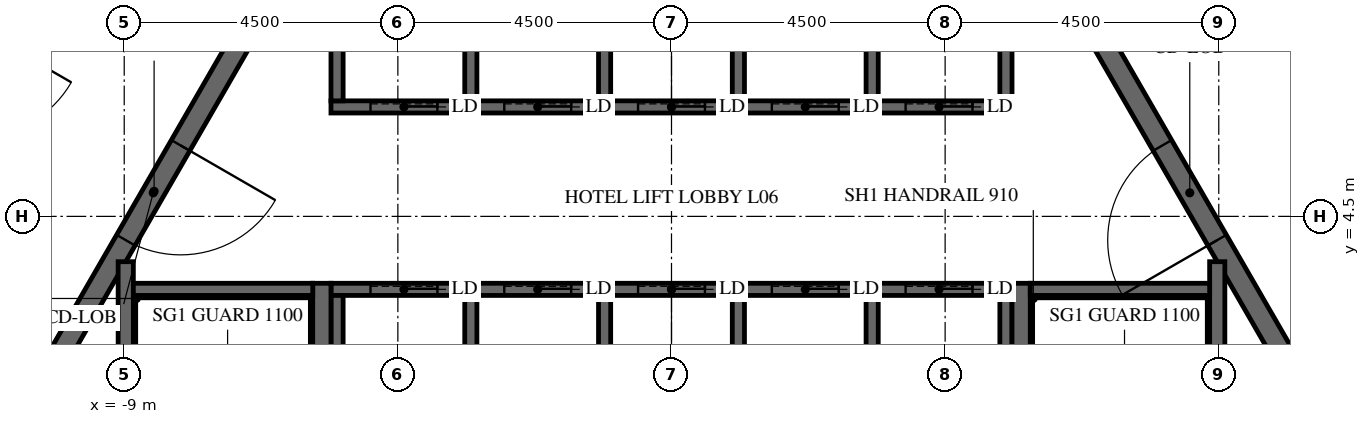
"""IFC4 building model, lengths in metres.
Left out: names, types, materials, properties, quantities, classifications, styles, units other than length and angle.
Written with IfcOpenShell. Run it as: python <this file> out.ifc"""

import sys

from ifc_helpers import new_model, si_unit, direction, frame, frame_2d, origin, place, context, subcontext, project, spatial, polyline, rectangle, outline, extrude, element, fill, save


model = new_model("IFC4")
c1 = context("Model", 3, precision=1e-05, world=origin(), true_north=direction((0.0, 1.0)))
c2 = subcontext(c1, "Body", "Model", "MODEL_VIEW")
j1 = project(units=[si_unit("LENGTHUNIT", "METRE"), si_unit("PLANEANGLEUNIT", "RADIAN")], contexts=[c1])
p1 = place(None, origin())
s1 = spatial("IfcSite", under=j1, at=p1, CompositionType="ELEMENT")
p2 = place(p1, origin())
s2 = spatial("IfcBuilding", under=s1, at=p2, CompositionType="ELEMENT")
p3 = place(p2, frame((0.0, 0.0, 37.5)))
s3 = spatial("IfcBuildingStorey", under=s2, at=p3, CompositionType="ELEMENT", Elevation=37.5)
p4 = place(p3, frame((-7.91, 13.7, -0.15), z_axis=(0.0, 0.0, 1.0), x_axis=(-0.499999880136, -0.866025472988, 0.0)))
e1 = element("IfcWall", 1, at=p4, inside=s3, PredefinedType="SHEAR", context=c2, shape_type="SweptSolid", body=[
    extrude(outline(polyline([(-0.173, -0.3), (15.993, -0.3), (15.646, 0.3), (0.173, 0.3), (-0.173, -0.3)])), origin(), (0.0, 0.0, 1.0), 3.9),
])
p5 = place(p4, frame((7.039, 0.0, 0.15)))
e2 = element("IfcOpeningElement", 2, at=p5, cuts=e1, PredefinedType="OPENING", context=c2, shape_type="SweptSolid", body=[
    extrude(rectangle(XDim=1.8, YDim=2.4, at=frame_2d((0.9, 1.2))), frame((0.0, 0.31, 0.0), z_axis=(0.0, -1.0, 0.0), x_axis=(1.0, 0.0, 0.0)), (0.0, 0.0, 1.0), 0.62),
])
p6 = place(p3, frame((15.819, 0.0, -0.15), z_axis=(0.0, 0.0, 1.0), x_axis=(-0.499999880136, 0.866025472988, 0.0)))
e3 = element("IfcWall", 3, at=p6, inside=s3, PredefinedType="SHEAR", context=c2, shape_type="SweptSolid", body=[
    extrude(outline(polyline([(-0.173, -0.3), (15.993, -0.3), (15.646, 0.3), (0.173, 0.3), (-0.173, -0.3)])), origin(), (0.0, 0.0, 1.0), 3.9),
])
p7 = place(p6, frame((6.981, 0.0, 0.15)))
e4 = element("IfcOpeningElement", 4, at=p7, cuts=e3, PredefinedType="OPENING", context=c2, shape_type="SweptSolid", body=[
    extrude(rectangle(XDim=1.8, YDim=2.4, at=frame_2d((0.9, 1.2))), frame((0.0, 0.31, 0.0), z_axis=(0.0, -1.0, 0.0), x_axis=(1.0, 0.0, 0.0)), (0.0, 0.0, 1.0), 0.62),
])
p8 = place(p3, frame((-5.673, 9.825, -0.15), z_axis=(0.0, 0.0, 1.0), x_axis=(-0.499995046907, -0.866028263435, 0.0)))
e5 = element("IfcWall", 5, at=p8, inside=s3, PredefinedType="SHEAR", context=c2, shape_type="SweptSolid", body=[
    extrude(outline(polyline([(-0.101, -0.175), (11.446, -0.175), (11.244, 0.175), (0.101, 0.175), (-0.101, -0.175)])), origin(), (0.0, 0.0, 1.0), 3.9),
])
p9 = place(p8, frame((4.801, 0.0, 0.15)))
e6 = element("IfcOpeningElement", 6, at=p9, cuts=e5, PredefinedType="OPENING", context=c2, shape_type="SweptSolid", body=[
    extrude(rectangle(XDim=1.8, YDim=2.4, at=frame_2d((0.9, 1.2))), frame((0.0, 0.185, 0.0), z_axis=(0.0, -1.0, 0.0), x_axis=(1.0, 0.0, 0.0)), (0.0, 0.0, 1.0), 0.37),
])
p10 = place(p3, frame((11.345, 0.0, -0.15), z_axis=(0.0, 0.0, 1.0), x_axis=(-0.499995046907, 0.866028263435, 0.0)))
e7 = element("IfcWall", 7, at=p10, inside=s3, PredefinedType="SHEAR", context=c2, shape_type="SweptSolid", body=[
    extrude(outline(polyline([(-0.101, -0.175), (11.446, -0.175), (11.244, 0.175), (0.101, 0.175), (-0.101, -0.175)])), origin(), (0.0, 0.0, 1.0), 3.9),
])
p11 = place(p10, frame((4.744, 0.0, 0.15)))
e8 = element("IfcOpeningElement", 8, at=p11, cuts=e7, PredefinedType="OPENING", context=c2, shape_type="SweptSolid", body=[
    extrude(rectangle(XDim=1.8, YDim=2.4, at=frame_2d((0.9, 1.2))), frame((0.0, 0.185, 0.0), z_axis=(0.0, -1.0, 0.0), x_axis=(1.0, 0.0, 0.0)), (0.0, 0.0, 1.0), 0.37),
])
p12 = place(p3, frame((-5.6, 6.3, -0.25), z_axis=(0.0, 0.0, 1.0), x_axis=(1.0, 0.0, 0.0)))
e9 = element("IfcWall", 9, at=p12, inside=s3, PredefinedType="SHEAR", context=c2, shape_type="SweptSolid", body=[
    extrude(rectangle(XDim=11.2, YDim=0.2, at=frame_2d((5.6, 0.0))), origin(), (0.0, 0.0, 1.0), 3.9),
])
p13 = place(p12, frame((0.65, 0.0, 0.25)))
e10 = element("IfcOpeningElement", 10, at=p13, cuts=e9, PredefinedType="OPENING", context=c2, shape_type="SweptSolid", body=[
    extrude(rectangle(XDim=1.1, YDim=2.1, at=frame_2d((0.55, 1.05))), frame((0.0, 0.11, 0.0), z_axis=(0.0, -1.0, 0.0), x_axis=(1.0, 0.0, 0.0)), (0.0, 0.0, 1.0), 0.22),
])
p14 = place(p12, frame((2.85, 0.0, 0.25)))
e11 = element("IfcOpeningElement", 11, at=p14, cuts=e9, PredefinedType="OPENING", context=c2, shape_type="SweptSolid", body=[
    extrude(rectangle(XDim=1.1, YDim=2.1, at=frame_2d((0.55, 1.05))), frame((0.0, 0.11, 0.0), z_axis=(0.0, -1.0, 0.0), x_axis=(1.0, 0.0, 0.0)), (0.0, 0.0, 1.0), 0.22),
])
p15 = place(p12, frame((5.05, 0.0, 0.25)))
e12 = element("IfcOpeningElement", 12, at=p15, cuts=e9, PredefinedType="OPENING", context=c2, shape_type="SweptSolid", body=[
    extrude(rectangle(XDim=1.1, YDim=2.1, at=frame_2d((0.55, 1.05))), frame((0.0, 0.11, 0.0), z_axis=(0.0, -1.0, 0.0), x_axis=(1.0, 0.0, 0.0)), (0.0, 0.0, 1.0), 0.22),
])
p16 = place(p12, frame((7.25, 0.0, 0.25)))
e13 = element("IfcOpeningElement", 13, at=p16, cuts=e9, PredefinedType="OPENING", context=c2, shape_type="SweptSolid", body=[
    extrude(rectangle(XDim=1.1, YDim=2.1, at=frame_2d((0.55, 1.05))), frame((0.0, 0.11, 0.0), z_axis=(0.0, -1.0, 0.0), x_axis=(1.0, 0.0, 0.0)), (0.0, 0.0, 1.0), 0.22),
])
p17 = place(p12, frame((9.45, 0.0, 0.25)))
e14 = element("IfcOpeningElement", 14, at=p17, cuts=e9, PredefinedType="OPENING", context=c2, shape_type="SweptSolid", body=[
    extrude(rectangle(XDim=1.1, YDim=2.1, at=frame_2d((0.55, 1.05))), frame((0.0, 0.11, 0.0), z_axis=(0.0, -1.0, 0.0), x_axis=(1.0, 0.0, 0.0)), (0.0, 0.0, 1.0), 0.22),
])
for number, where, z_axis, x_axis in (
    (15, (-5.5, 6.4, -0.25), (0.0, 0.0, 1.0), (0.0, 1.0, 0.0)),
    (16, (-3.3, 6.4, -0.25), (0.0, 0.0, 1.0), (0.0, 1.0, 0.0)),
    (17, (-1.1, 6.4, -0.25), (0.0, 0.0, 1.0), (0.0, 1.0, 0.0)),
    (18, (1.1, 6.4, -0.25), (0.0, 0.0, 1.0), (0.0, 1.0, 0.0)),
    (19, (3.3, 6.4, -0.25), (0.0, 0.0, 1.0), (0.0, 1.0, 0.0)),
    (20, (5.5, 6.4, -0.25), (0.0, 0.0, 1.0), (0.0, 1.0, 0.0)),
):
    element("IfcWall", number, at=place(p3, frame(where, z_axis=z_axis, x_axis=x_axis)), inside=s3, PredefinedType="SHEAR", context=c2, shape_type="SweptSolid", body=[
        extrude(rectangle(XDim=2.9, YDim=0.2, at=frame_2d((1.45, 0.0))), origin(), (0.0, 0.0, 1.0), 3.9),
    ])
p18 = place(p3, frame((-5.6, 3.3, -0.25), z_axis=(0.0, 0.0, 1.0), x_axis=(1.0, 0.0, 0.0)))
e21 = element("IfcWall", 21, at=p18, inside=s3, PredefinedType="SHEAR", context=c2, shape_type="SweptSolid", body=[
    extrude(rectangle(XDim=11.2, YDim=0.2, at=frame_2d((5.6, 0.0))), origin(), (0.0, 0.0, 1.0), 3.9),
])
p19 = place(p18, frame((0.65, 0.0, 0.25)))
e22 = element("IfcOpeningElement", 22, at=p19, cuts=e21, PredefinedType="OPENING", context=c2, shape_type="SweptSolid", body=[
    extrude(rectangle(XDim=1.1, YDim=2.1, at=frame_2d((0.55, 1.05))), frame((0.0, 0.11, 0.0), z_axis=(0.0, -1.0, 0.0), x_axis=(1.0, 0.0, 0.0)), (0.0, 0.0, 1.0), 0.22),
])
p20 = place(p18, frame((2.85, 0.0, 0.25)))
e23 = element("IfcOpeningElement", 23, at=p20, cuts=e21, PredefinedType="OPENING", context=c2, shape_type="SweptSolid", body=[
    extrude(rectangle(XDim=1.1, YDim=2.1, at=frame_2d((0.55, 1.05))), frame((0.0, 0.11, 0.0), z_axis=(0.0, -1.0, 0.0), x_axis=(1.0, 0.0, 0.0)), (0.0, 0.0, 1.0), 0.22),
])
p21 = place(p18, frame((5.05, 0.0, 0.25)))
e24 = element("IfcOpeningElement", 24, at=p21, cuts=e21, PredefinedType="OPENING", context=c2, shape_type="SweptSolid", body=[
    extrude(rectangle(XDim=1.1, YDim=2.1, at=frame_2d((0.55, 1.05))), frame((0.0, 0.11, 0.0), z_axis=(0.0, -1.0, 0.0), x_axis=(1.0, 0.0, 0.0)), (0.0, 0.0, 1.0), 0.22),
])
p22 = place(p18, frame((7.25, 0.0, 0.25)))
e25 = element("IfcOpeningElement", 25, at=p22, cuts=e21, PredefinedType="OPENING", context=c2, shape_type="SweptSolid", body=[
    extrude(rectangle(XDim=1.1, YDim=2.1, at=frame_2d((0.55, 1.05))), frame((0.0, 0.11, 0.0), z_axis=(0.0, -1.0, 0.0), x_axis=(1.0, 0.0, 0.0)), (0.0, 0.0, 1.0), 0.22),
])
p23 = place(p18, frame((9.45, 0.0, 0.25)))
e26 = element("IfcOpeningElement", 26, at=p23, cuts=e21, PredefinedType="OPENING", context=c2, shape_type="SweptSolid", body=[
    extrude(rectangle(XDim=1.1, YDim=2.1, at=frame_2d((0.55, 1.05))), frame((0.0, 0.11, 0.0), z_axis=(0.0, -1.0, 0.0), x_axis=(1.0, 0.0, 0.0)), (0.0, 0.0, 1.0), 0.22),
])
for number, where, z_axis, x_axis in (
    (27, (-5.5, 0.1, -0.25), (0.0, 0.0, 1.0), (0.0, 1.0, 0.0)),
    (28, (-3.3, 0.1, -0.25), (0.0, 0.0, 1.0), (0.0, 1.0, 0.0)),
    (29, (-1.1, 0.1, -0.25), (0.0, 0.0, 1.0), (0.0, 1.0, 0.0)),
    (30, (1.1, 0.1, -0.25), (0.0, 0.0, 1.0), (0.0, 1.0, 0.0)),
    (31, (3.3, 0.1, -0.25), (0.0, 0.0, 1.0), (0.0, 1.0, 0.0)),
    (32, (5.5, 0.1, -0.25), (0.0, 0.0, 1.0), (0.0, 1.0, 0.0)),
):
    element("IfcWall", number, at=place(p3, frame(where, z_axis=z_axis, x_axis=x_axis)), inside=s3, PredefinedType="SHEAR", context=c2, shape_type="SweptSolid", body=[
        extrude(rectangle(XDim=3.1, YDim=0.2, at=frame_2d((1.55, 0.0))), origin(), (0.0, 0.0, 1.0), 3.9),
    ])
p24 = place(p3, frame((5.75, -3.4, -0.25), z_axis=(0.0, 0.0, 1.0), x_axis=(0.0, 1.0, 0.0)))
e33 = element("IfcWall", 33, at=p24, inside=s3, PredefinedType="SHEAR", context=c2, shape_type="SweptSolid", body=[
    extrude(rectangle(XDim=6.8, YDim=0.3, at=frame_2d((3.4, 0.0))), origin(), (0.0, 0.0, 1.0), 3.9),
])
p25 = place(p3, frame((8.975, -3.755, -0.25), z_axis=(0.0, 0.0, 1.0), x_axis=(0.0, 1.0, 0.0)))
e34 = element("IfcWall", 34, at=p25, inside=s3, PredefinedType="SHEAR", context=c2, shape_type="SweptSolid", body=[
    extrude(rectangle(XDim=7.51, YDim=0.25, at=frame_2d((3.755, 0.0))), origin(), (0.0, 0.0, 1.0), 3.9),
])
p26 = place(p3, frame((5.9, 3.3, -0.25), z_axis=(0.0, 0.0, 1.0), x_axis=(1.0, 0.0, 0.0)))
e35 = element("IfcWall", 35, at=p26, inside=s3, PredefinedType="SHEAR", context=c2, shape_type="SweptSolid", body=[
    extrude(rectangle(XDim=2.95, YDim=0.2, at=frame_2d((1.475, 0.0))), origin(), (0.0, 0.0, 1.0), 3.9),
])
p27 = place(p3, frame((-5.75, -3.4, -0.25), z_axis=(0.0, 0.0, 1.0), x_axis=(0.0, 1.0, 0.0)))
e36 = element("IfcWall", 36, at=p27, inside=s3, PredefinedType="SHEAR", context=c2, shape_type="SweptSolid", body=[
    extrude(rectangle(XDim=6.8, YDim=0.3, at=frame_2d((3.4, 0.0))), origin(), (0.0, 0.0, 1.0), 3.9),
])
p28 = place(p3, frame((-8.975, -3.755, -0.25), z_axis=(0.0, 0.0, 1.0), x_axis=(0.0, 1.0, 0.0)))
e37 = element("IfcWall", 37, at=p28, inside=s3, PredefinedType="SHEAR", context=c2, shape_type="SweptSolid", body=[
    extrude(rectangle(XDim=7.51, YDim=0.25, at=frame_2d((3.755, 0.0))), origin(), (0.0, 0.0, 1.0), 3.9),
])
p29 = place(p3, frame((-8.85, 3.3, -0.25), z_axis=(0.0, 0.0, 1.0), x_axis=(1.0, 0.0, 0.0)))
e38 = element("IfcWall", 38, at=p29, inside=s3, PredefinedType="SHEAR", context=c2, shape_type="SweptSolid", body=[
    extrude(rectangle(XDim=2.95, YDim=0.2, at=frame_2d((1.475, 0.0))), origin(), (0.0, 0.0, 1.0), 3.9),
])
p30 = place(p9, origin())
e39 = element("IfcDoor", 39, at=p30, inside=s3, OperationType="DOUBLE_DOOR_SINGLE_SWING", PredefinedType="DOOR", context=c2, shape_type="SweptSolid", body=[
    extrude(rectangle(XDim=1.8, YDim=2.4, at=frame_2d((0.9, 1.2))), frame((0.0, 0.025, 0.0), z_axis=(0.0, -1.0, 0.0), x_axis=(1.0, 0.0, 0.0)), (0.0, 0.0, 1.0), 0.05),
])
fill(e6, e39)
p31 = place(p11, origin())
e40 = element("IfcDoor", 40, at=p31, inside=s3, OperationType="DOUBLE_DOOR_SINGLE_SWING", PredefinedType="DOOR", context=c2, shape_type="SweptSolid", body=[
    extrude(rectangle(XDim=1.8, YDim=2.4, at=frame_2d((0.9, 1.2))), frame((0.0, 0.025, 0.0), z_axis=(0.0, -1.0, 0.0), x_axis=(1.0, 0.0, 0.0)), (0.0, 0.0, 1.0), 0.05),
])
fill(e8, e40)
p32 = place(p13, origin())
e41 = element("IfcDoor", 41, at=p32, inside=s3, OperationType="SLIDING_TO_LEFT", PredefinedType="DOOR", context=c2, shape_type="SweptSolid", body=[
    extrude(rectangle(XDim=1.1, YDim=2.1, at=frame_2d((0.55, 1.05))), frame((0.0, 0.025, 0.0), z_axis=(0.0, -1.0, 0.0), x_axis=(1.0, 0.0, 0.0)), (0.0, 0.0, 1.0), 0.05),
])
fill(e10, e41)
p33 = place(p14, origin())
e42 = element("IfcDoor", 42, at=p33, inside=s3, OperationType="SLIDING_TO_LEFT", PredefinedType="DOOR", context=c2, shape_type="SweptSolid", body=[
    extrude(rectangle(XDim=1.1, YDim=2.1, at=frame_2d((0.55, 1.05))), frame((0.0, 0.025, 0.0), z_axis=(0.0, -1.0, 0.0), x_axis=(1.0, 0.0, 0.0)), (0.0, 0.0, 1.0), 0.05),
])
fill(e11, e42)
p34 = place(p15, origin())
e43 = element("IfcDoor", 43, at=p34, inside=s3, OperationType="SLIDING_TO_LEFT", PredefinedType="DOOR", context=c2, shape_type="SweptSolid", body=[
    extrude(rectangle(XDim=1.1, YDim=2.1, at=frame_2d((0.55, 1.05))), frame((0.0, 0.025, 0.0), z_axis=(0.0, -1.0, 0.0), x_axis=(1.0, 0.0, 0.0)), (0.0, 0.0, 1.0), 0.05),
])
fill(e12, e43)
p35 = place(p16, origin())
e44 = element("IfcDoor", 44, at=p35, inside=s3, OperationType="SLIDING_TO_LEFT", PredefinedType="DOOR", context=c2, shape_type="SweptSolid", body=[
    extrude(rectangle(XDim=1.1, YDim=2.1, at=frame_2d((0.55, 1.05))), frame((0.0, 0.025, 0.0), z_axis=(0.0, -1.0, 0.0), x_axis=(1.0, 0.0, 0.0)), (0.0, 0.0, 1.0), 0.05),
])
fill(e13, e44)
p36 = place(p17, origin())
e45 = element("IfcDoor", 45, at=p36, inside=s3, OperationType="SLIDING_TO_LEFT", PredefinedType="DOOR", context=c2, shape_type="SweptSolid", body=[
    extrude(rectangle(XDim=1.1, YDim=2.1, at=frame_2d((0.55, 1.05))), frame((0.0, 0.025, 0.0), z_axis=(0.0, -1.0, 0.0), x_axis=(1.0, 0.0, 0.0)), (0.0, 0.0, 1.0), 0.05),
])
fill(e14, e45)
p37 = place(p19, origin())
e46 = element("IfcDoor", 46, at=p37, inside=s3, OperationType="SLIDING_TO_LEFT", PredefinedType="DOOR", context=c2, shape_type="SweptSolid", body=[
    extrude(rectangle(XDim=1.1, YDim=2.1, at=frame_2d((0.55, 1.05))), frame((0.0, 0.025, 0.0), z_axis=(0.0, -1.0, 0.0), x_axis=(1.0, 0.0, 0.0)), (0.0, 0.0, 1.0), 0.05),
])
fill(e22, e46)
p38 = place(p20, origin())
e47 = element("IfcDoor", 47, at=p38, inside=s3, OperationType="SLIDING_TO_LEFT", PredefinedType="DOOR", context=c2, shape_type="SweptSolid", body=[
    extrude(rectangle(XDim=1.1, YDim=2.1, at=frame_2d((0.55, 1.05))), frame((0.0, 0.025, 0.0), z_axis=(0.0, -1.0, 0.0), x_axis=(1.0, 0.0, 0.0)), (0.0, 0.0, 1.0), 0.05),
])
fill(e23, e47)
p39 = place(p21, origin())
e48 = element("IfcDoor", 48, at=p39, inside=s3, OperationType="SLIDING_TO_LEFT", PredefinedType="DOOR", context=c2, shape_type="SweptSolid", body=[
    extrude(rectangle(XDim=1.1, YDim=2.1, at=frame_2d((0.55, 1.05))), frame((0.0, 0.025, 0.0), z_axis=(0.0, -1.0, 0.0), x_axis=(1.0, 0.0, 0.0)), (0.0, 0.0, 1.0), 0.05),
])
fill(e24, e48)
p40 = place(p22, origin())
e49 = element("IfcDoor", 49, at=p40, inside=s3, OperationType="SLIDING_TO_LEFT", PredefinedType="DOOR", context=c2, shape_type="SweptSolid", body=[
    extrude(rectangle(XDim=1.1, YDim=2.1, at=frame_2d((0.55, 1.05))), frame((0.0, 0.025, 0.0), z_axis=(0.0, -1.0, 0.0), x_axis=(1.0, 0.0, 0.0)), (0.0, 0.0, 1.0), 0.05),
])
fill(e25, e49)
p41 = place(p23, origin())
e50 = element("IfcDoor", 50, at=p41, inside=s3, OperationType="SLIDING_TO_LEFT", PredefinedType="DOOR", context=c2, shape_type="SweptSolid", body=[
    extrude(rectangle(XDim=1.1, YDim=2.1, at=frame_2d((0.55, 1.05))), frame((0.0, 0.025, 0.0), z_axis=(0.0, -1.0, 0.0), x_axis=(1.0, 0.0, 0.0)), (0.0, 0.0, 1.0), 0.05),
])
fill(e26, e50)
save(model, sys.argv[1])
